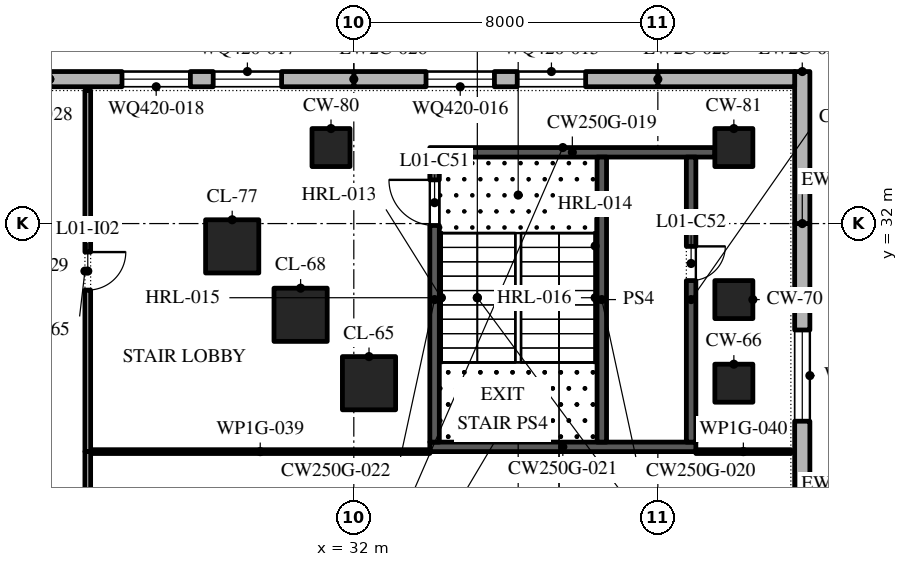
"""IFC4 building model, lengths in metres.
Left out: names, types, materials, properties, quantities, classifications, styles, units other than length and angle.
Written with IfcOpenShell. Run it as: python <this file> out.ifc"""

import sys

from ifc_helpers import new_model, si_unit, direction, frame, frame_2d, origin, origin_2d, place, context, subcontext, project, spatial, polyline, rectangle, outline, extrude, element, fill, save


model = new_model("IFC4")
c1 = context("Model", 3, precision=1e-05, world=origin(), true_north=direction((0.0, 1.0)))
c2 = subcontext(c1, "Body", "Model", "MODEL_VIEW")
j1 = project(units=[si_unit("LENGTHUNIT", "METRE"), si_unit("PLANEANGLEUNIT", "RADIAN")], contexts=[c1])
p1 = place(None, origin())
s1 = spatial("IfcSite", under=j1, at=p1, CompositionType="ELEMENT")
p2 = place(p1, origin())
s2 = spatial("IfcBuilding", under=s1, at=p2, CompositionType="ELEMENT")
p3 = place(p2, frame((0.0, 0.0, 8.0)))
s3 = spatial("IfcBuildingStorey", under=s2, at=p3, CompositionType="ELEMENT", Elevation=8.0)
p4 = place(p3, frame((32.4, 27.8, 0.0), z_axis=(0.0, 0.0, 1.0), x_axis=(1.0, 0.0, 0.0)))
e1 = element("IfcColumn", 1, at=p4, inside=s3, PredefinedType="COLUMN", context=c2, shape_type="SweptSolid", body=[
    extrude(rectangle(XDim=1.4, YDim=1.4, at=origin_2d()), origin(), (0.0, 0.0, 1.0), 6.0),
])
p5 = place(p3, frame((42.0, 27.8, 0.0), z_axis=(0.0, 0.0, 1.0), x_axis=(1.0, 0.0, 0.0)))
e2 = element("IfcColumn", 2, at=p5, inside=s3, PredefinedType="COLUMN", context=c2, shape_type="SweptSolid", body=[
    extrude(rectangle(XDim=1.0, YDim=1.0, at=origin_2d()), origin(), (0.0, 0.0, 1.0), 6.0),
])
p6 = place(p3, frame((30.6, 29.6, 0.0), z_axis=(0.0, 0.0, 1.0), x_axis=(1.0, 0.0, 0.0)))
e3 = element("IfcColumn", 3, at=p6, inside=s3, PredefinedType="COLUMN", context=c2, shape_type="SweptSolid", body=[
    extrude(rectangle(XDim=1.4, YDim=1.4, at=origin_2d()), origin(), (0.0, 0.0, 1.0), 6.0),
])
p7 = place(p3, frame((42.0, 30.0, 0.0), z_axis=(0.0, 0.0, 1.0), x_axis=(1.0, 0.0, 0.0)))
e4 = element("IfcColumn", 4, at=p7, inside=s3, PredefinedType="COLUMN", context=c2, shape_type="SweptSolid", body=[
    extrude(rectangle(XDim=1.0, YDim=1.0, at=origin_2d()), origin(), (0.0, 0.0, 1.0), 6.0),
])
p8 = place(p3, frame((28.8, 31.4, 0.0), z_axis=(0.0, 0.0, 1.0), x_axis=(1.0, 0.0, 0.0)))
e5 = element("IfcColumn", 5, at=p8, inside=s3, PredefinedType="COLUMN", context=c2, shape_type="SweptSolid", body=[
    extrude(rectangle(XDim=1.4, YDim=1.4, at=origin_2d()), origin(), (0.0, 0.0, 1.0), 6.0),
])
for number, where, z_axis, x_axis in (
    (6, (31.4, 34.0, 0.0), (0.0, 0.0, 1.0), (1.0, 0.0, 0.0)),
    (7, (42.0, 34.0, 0.0), (0.0, 0.0, 1.0), (1.0, 0.0, 0.0)),
):
    element("IfcColumn", number, at=place(p3, frame(where, z_axis=z_axis, x_axis=x_axis)), inside=s3, PredefinedType="COLUMN", context=c2, shape_type="SweptSolid", body=[
        extrude(rectangle(XDim=1.0, YDim=1.0, at=origin_2d()), origin(), (0.0, 0.0, 1.0), 6.0),
    ])
p9 = place(p3, frame((43.8, 24.0, 0.0), z_axis=(0.0, 0.0, 1.0), x_axis=(0.0, 1.0, 0.0)))
e8 = element("IfcWall", 8, at=p9, inside=s3, PredefinedType="STANDARD", context=c2, shape_type="SweptSolid", body=[
    extrude(rectangle(XDim=8.0, YDim=0.4, at=frame_2d((4.0, 0.0))), origin(), (0.0, 0.0, 1.0), 5.7),
])
p10 = place(p9, frame((2.8, 0.0, 0.9)))
e9 = element("IfcOpeningElement", 9, at=p10, cuts=e8, PredefinedType="OPENING", context=c2, shape_type="SweptSolid", body=[
    extrude(outline(polyline([(0.0, 0.0), (2.4, 0.0), (2.4, 2.122), (2.379, 2.435), (2.318, 2.743), (2.217, 3.04), (2.078, 3.322), (1.904, 3.583), (1.697, 3.819), (1.461, 4.026), (1.2, 4.2), (0.939, 4.026), (0.703, 3.819), (0.496, 3.583), (0.322, 3.322), (0.183, 3.04), (0.082, 2.743), (0.021, 2.435), (0.0, 2.122), (0.0, 0.0)])), frame((0.0, 0.21, 0.0), z_axis=(0.0, -1.0, 0.0), x_axis=(1.0, 0.0, 0.0)), (0.0, 0.0, 1.0), 0.42),
])
p11 = place(p3, frame((43.8, 32.0, 0.0), z_axis=(0.0, 0.0, 1.0), x_axis=(0.0, 1.0, 0.0)))
e10 = element("IfcWall", 10, at=p11, inside=s3, PredefinedType="STANDARD", context=c2, shape_type="SweptSolid", body=[
    extrude(rectangle(XDim=4.0, YDim=0.4, at=frame_2d((2.0, 0.0))), origin(), (0.0, 0.0, 1.0), 5.7),
])
p12 = place(p3, frame((43.6, 35.8, 0.0), z_axis=(0.0, 0.0, 1.0), x_axis=(-1.0, 0.0, 0.0)))
e11 = element("IfcWall", 11, at=p12, inside=s3, PredefinedType="STANDARD", context=c2, shape_type="SweptSolid", body=[
    extrude(rectangle(XDim=3.6, YDim=0.4, at=frame_2d((1.8, 0.0))), origin(), (0.0, 0.0, 1.0), 5.7),
])
p13 = place(p3, frame((40.0, 35.8, 0.0), z_axis=(0.0, 0.0, 1.0), x_axis=(-1.0, 0.0, 0.0)))
e12 = element("IfcWall", 12, at=p13, inside=s3, PredefinedType="STANDARD", context=c2, shape_type="SweptSolid", body=[
    extrude(rectangle(XDim=8.0, YDim=0.4, at=frame_2d((4.0, 0.0))), origin(), (0.0, 0.0, 1.0), 5.7),
])
p14 = place(p13, frame((1.9, 0.0, 0.9)))
e13 = element("IfcOpeningElement", 13, at=p14, cuts=e12, PredefinedType="OPENING", context=c2, shape_type="SweptSolid", body=[
    extrude(outline(polyline([(0.0, 0.0), (1.8, 0.0), (1.8, 2.641), (1.785, 2.876), (1.739, 3.107), (1.663, 3.33), (1.559, 3.541), (1.428, 3.737), (1.273, 3.914), (1.096, 4.069), (0.9, 4.2), (0.704, 4.069), (0.527, 3.914), (0.372, 3.737), (0.241, 3.541), (0.137, 3.33), (0.061, 3.107), (0.015, 2.876), (0.0, 2.641), (0.0, 0.0)])), frame((0.0, 0.21, 0.0), z_axis=(0.0, -1.0, 0.0), x_axis=(1.0, 0.0, 0.0)), (0.0, 0.0, 1.0), 0.42),
])
p15 = place(p13, frame((4.3, 0.0, 0.9)))
e14 = element("IfcOpeningElement", 14, at=p15, cuts=e12, PredefinedType="OPENING", context=c2, shape_type="SweptSolid", body=[
    extrude(outline(polyline([(0.0, 0.0), (1.8, 0.0), (1.8, 2.641), (1.785, 2.876), (1.739, 3.107), (1.663, 3.33), (1.559, 3.541), (1.428, 3.737), (1.273, 3.914), (1.096, 4.069), (0.9, 4.2), (0.704, 4.069), (0.527, 3.914), (0.372, 3.737), (0.241, 3.541), (0.137, 3.33), (0.061, 3.107), (0.015, 2.876), (0.0, 2.641), (0.0, 0.0)])), frame((0.0, 0.21, 0.0), z_axis=(0.0, -1.0, 0.0), x_axis=(1.0, 0.0, 0.0)), (0.0, 0.0, 1.0), 0.42),
])
p16 = place(p3, frame((32.0, 35.8, 0.0), z_axis=(0.0, 0.0, 1.0), x_axis=(-1.0, 0.0, 0.0)))
e15 = element("IfcWall", 15, at=p16, inside=s3, PredefinedType="STANDARD", context=c2, shape_type="SweptSolid", body=[
    extrude(rectangle(XDim=8.0, YDim=0.4, at=frame_2d((4.0, 0.0))), origin(), (0.0, 0.0, 1.0), 5.7),
])
p17 = place(p16, frame((1.9, 0.0, 0.9)))
e16 = element("IfcOpeningElement", 16, at=p17, cuts=e15, PredefinedType="OPENING", context=c2, shape_type="SweptSolid", body=[
    extrude(outline(polyline([(0.0, 0.0), (1.8, 0.0), (1.8, 2.641), (1.785, 2.876), (1.739, 3.107), (1.663, 3.33), (1.559, 3.541), (1.428, 3.737), (1.273, 3.914), (1.096, 4.069), (0.9, 4.2), (0.704, 4.069), (0.527, 3.914), (0.372, 3.737), (0.241, 3.541), (0.137, 3.33), (0.061, 3.107), (0.015, 2.876), (0.0, 2.641), (0.0, 0.0)])), frame((0.0, 0.21, 0.0), z_axis=(0.0, -1.0, 0.0), x_axis=(1.0, 0.0, 0.0)), (0.0, 0.0, 1.0), 0.42),
])
p18 = place(p16, frame((4.3, 0.0, 0.9)))
e17 = element("IfcOpeningElement", 17, at=p18, cuts=e15, PredefinedType="OPENING", context=c2, shape_type="SweptSolid", body=[
    extrude(outline(polyline([(0.0, 0.0), (1.8, 0.0), (1.8, 2.641), (1.785, 2.876), (1.739, 3.107), (1.663, 3.33), (1.559, 3.541), (1.428, 3.737), (1.273, 3.914), (1.096, 4.069), (0.9, 4.2), (0.704, 4.069), (0.527, 3.914), (0.372, 3.737), (0.241, 3.541), (0.137, 3.33), (0.061, 3.107), (0.015, 2.876), (0.0, 2.641), (0.0, 0.0)])), frame((0.0, 0.21, 0.0), z_axis=(0.0, -1.0, 0.0), x_axis=(1.0, 0.0, 0.0)), (0.0, 0.0, 1.0), 0.42),
])
p19 = place(p3, frame((34.0, 26.125, 0.0), z_axis=(0.0, 0.0, 1.0), x_axis=(1.0, 0.0, 0.0)))
e18 = element("IfcWall", 18, at=p19, inside=s3, PredefinedType="SHEAR", context=c2, shape_type="SweptSolid", body=[
    extrude(rectangle(XDim=7.0, YDim=0.25, at=frame_2d((3.5, 0.0))), origin(), (0.0, 0.0, 1.0), 5.7),
])
p20 = place(p3, frame((34.0, 33.875, 0.0), z_axis=(0.0, 0.0, 1.0), x_axis=(1.0, 0.0, 0.0)))
e19 = element("IfcWall", 19, at=p20, inside=s3, PredefinedType="SHEAR", context=c2, shape_type="SweptSolid", body=[
    extrude(rectangle(XDim=7.5, YDim=0.25, at=frame_2d((3.75, 0.0))), origin(), (0.0, 0.0, 1.0), 5.7),
])
p21 = place(p3, frame((34.125, 26.25, 0.0), z_axis=(0.0, 0.0, 1.0), x_axis=(0.0, 1.0, 0.0)))
e20 = element("IfcWall", 20, at=p21, inside=s3, PredefinedType="SHEAR", context=c2, shape_type="SweptSolid", body=[
    extrude(rectangle(XDim=7.5, YDim=0.25, at=frame_2d((3.75, 0.0))), origin(), (0.0, 0.0, 1.0), 5.7),
])
p22 = place(p21, frame((5.7, 0.0, 0.0)))
e21 = element("IfcOpeningElement", 21, at=p22, cuts=e20, PredefinedType="OPENING", context=c2, shape_type="SweptSolid", body=[
    extrude(rectangle(XDim=1.2, YDim=2.1, at=frame_2d((0.6, 1.05))), frame((0.0, 0.135, 0.0), z_axis=(0.0, -1.0, 0.0), x_axis=(1.0, 0.0, 0.0)), (0.0, 0.0, 1.0), 0.27),
])
p23 = place(p3, frame((40.875, 26.25, 0.0), z_axis=(0.0, 0.0, 1.0), x_axis=(0.0, 1.0, 0.0)))
e22 = element("IfcWall", 22, at=p23, inside=s3, PredefinedType="SHEAR", context=c2, shape_type="SweptSolid", body=[
    extrude(rectangle(XDim=7.5, YDim=0.25, at=frame_2d((3.75, 0.0))), origin(), (0.0, 0.0, 1.0), 5.7),
])
p24 = place(p23, frame((4.25, 0.0, 0.0)))
e23 = element("IfcOpeningElement", 23, at=p24, cuts=e22, PredefinedType="OPENING", context=c2, shape_type="SweptSolid", body=[
    extrude(rectangle(XDim=0.9, YDim=2.1, at=frame_2d((0.45, 1.05))), frame((0.0, 0.135, 0.0), z_axis=(0.0, -1.0, 0.0), x_axis=(1.0, 0.0, 0.0)), (0.0, 0.0, 1.0), 0.27),
])
p25 = place(p3, frame((38.525, 26.25, 0.0), z_axis=(0.0, 0.0, 1.0), x_axis=(0.0, 1.0, 0.0)))
e24 = element("IfcWall", 24, at=p25, inside=s3, PredefinedType="SHEAR", context=c2, shape_type="SweptSolid", body=[
    extrude(rectangle(XDim=7.5, YDim=0.25, at=frame_2d((3.75, 0.0))), origin(), (0.0, 0.0, 1.0), 5.7),
])
p26 = place(p3, frame((25.075, 26.0, 0.0), z_axis=(0.0, 0.0, 1.0), x_axis=(1.0, 0.0, 0.0)))
e25 = element("IfcWall", 25, at=p26, inside=s3, PredefinedType="PARTITIONING", context=c2, shape_type="SweptSolid", body=[
    extrude(rectangle(XDim=8.925, YDim=0.1, at=frame_2d((4.462, 0.0))), origin(), (0.0, 0.0, 1.0), 5.7),
])
p27 = place(p3, frame((41.0, 26.0, 0.0), z_axis=(0.0, 0.0, 1.0), x_axis=(1.0, 0.0, 0.0)))
e26 = element("IfcWall", 26, at=p27, inside=s3, PredefinedType="PARTITIONING", context=c2, shape_type="SweptSolid", body=[
    extrude(rectangle(XDim=2.5, YDim=0.1, at=frame_2d((1.25, 0.0))), origin(), (0.0, 0.0, 1.0), 5.7),
])
p28 = place(p3, frame((25.0, 15.0, 0.0), z_axis=(0.0, 0.0, 1.0), x_axis=(0.0, 1.0, 0.0)))
e27 = element("IfcWall", 27, at=p28, inside=s3, PredefinedType="PARTITIONING", context=c2, shape_type="SweptSolid", body=[
    extrude(rectangle(XDim=11.0, YDim=0.15, at=frame_2d((5.5, 0.0))), origin(), (0.0, 0.0, 1.0), 5.7),
])
p29 = place(p28, frame((4.6, 0.0, 0.0)))
e28 = element("IfcOpeningElement", 28, at=p29, cuts=e27, PredefinedType="OPENING", context=c2, shape_type="SweptSolid", body=[
    extrude(rectangle(XDim=1.8, YDim=2.1, at=frame_2d((0.9, 1.05))), frame((0.0, 0.085, 0.0), z_axis=(0.0, -1.0, 0.0), x_axis=(1.0, 0.0, 0.0)), (0.0, 0.0, 1.0), 0.17),
])
p30 = place(p3, frame((25.0, 26.0, 0.0), z_axis=(0.0, 0.0, 1.0), x_axis=(0.0, 1.0, 0.0)))
e29 = element("IfcWall", 29, at=p30, inside=s3, PredefinedType="PARTITIONING", context=c2, shape_type="SweptSolid", body=[
    extrude(rectangle(XDim=9.5, YDim=0.15, at=frame_2d((4.75, 0.0))), origin(), (0.0, 0.0, 1.0), 5.7),
])
p31 = place(p30, frame((4.25, 0.0, 0.0)))
e30 = element("IfcOpeningElement", 30, at=p31, cuts=e29, PredefinedType="OPENING", context=c2, shape_type="SweptSolid", body=[
    extrude(rectangle(XDim=1.0, YDim=2.1, at=frame_2d((0.5, 1.05))), frame((0.0, 0.085, 0.0), z_axis=(0.0, -1.0, 0.0), x_axis=(1.0, 0.0, 0.0)), (0.0, 0.0, 1.0), 0.17),
])
p32 = place(p10, origin())
e31 = element("IfcWindow", 31, at=p32, inside=s3, PartitioningType="DOUBLE_PANEL_VERTICAL", PredefinedType="WINDOW", context=c2, shape_type="SweptSolid", body=[
    extrude(outline(polyline([(0.0, 0.0), (2.4, 0.0), (2.4, 2.122), (2.379, 2.435), (2.318, 2.743), (2.217, 3.04), (2.078, 3.322), (1.904, 3.583), (1.697, 3.819), (1.461, 4.026), (1.2, 4.2), (0.939, 4.026), (0.703, 3.819), (0.496, 3.583), (0.322, 3.322), (0.183, 3.04), (0.082, 2.743), (0.021, 2.435), (0.0, 2.122), (0.0, 0.0)])), frame((0.0, 0.03, 0.0), z_axis=(0.0, -1.0, 0.0), x_axis=(1.0, 0.0, 0.0)), (0.0, 0.0, 1.0), 0.06),
])
fill(e9, e31)
p33 = place(p14, origin())
e32 = element("IfcWindow", 32, at=p33, inside=s3, PartitioningType="DOUBLE_PANEL_VERTICAL", PredefinedType="WINDOW", context=c2, shape_type="SweptSolid", body=[
    extrude(outline(polyline([(0.0, 0.0), (1.8, 0.0), (1.8, 2.641), (1.785, 2.876), (1.739, 3.107), (1.663, 3.33), (1.559, 3.541), (1.428, 3.737), (1.273, 3.914), (1.096, 4.069), (0.9, 4.2), (0.704, 4.069), (0.527, 3.914), (0.372, 3.737), (0.241, 3.541), (0.137, 3.33), (0.061, 3.107), (0.015, 2.876), (0.0, 2.641), (0.0, 0.0)])), frame((0.0, 0.03, 0.0), z_axis=(0.0, -1.0, 0.0), x_axis=(1.0, 0.0, 0.0)), (0.0, 0.0, 1.0), 0.06),
])
fill(e13, e32)
p34 = place(p15, origin())
e33 = element("IfcWindow", 33, at=p34, inside=s3, PartitioningType="DOUBLE_PANEL_VERTICAL", PredefinedType="WINDOW", context=c2, shape_type="SweptSolid", body=[
    extrude(outline(polyline([(0.0, 0.0), (1.8, 0.0), (1.8, 2.641), (1.785, 2.876), (1.739, 3.107), (1.663, 3.33), (1.559, 3.541), (1.428, 3.737), (1.273, 3.914), (1.096, 4.069), (0.9, 4.2), (0.704, 4.069), (0.527, 3.914), (0.372, 3.737), (0.241, 3.541), (0.137, 3.33), (0.061, 3.107), (0.015, 2.876), (0.0, 2.641), (0.0, 0.0)])), frame((0.0, 0.03, 0.0), z_axis=(0.0, -1.0, 0.0), x_axis=(1.0, 0.0, 0.0)), (0.0, 0.0, 1.0), 0.06),
])
fill(e14, e33)
p35 = place(p17, origin())
e34 = element("IfcWindow", 34, at=p35, inside=s3, PartitioningType="DOUBLE_PANEL_VERTICAL", PredefinedType="WINDOW", context=c2, shape_type="SweptSolid", body=[
    extrude(outline(polyline([(0.0, 0.0), (1.8, 0.0), (1.8, 2.641), (1.785, 2.876), (1.739, 3.107), (1.663, 3.33), (1.559, 3.541), (1.428, 3.737), (1.273, 3.914), (1.096, 4.069), (0.9, 4.2), (0.704, 4.069), (0.527, 3.914), (0.372, 3.737), (0.241, 3.541), (0.137, 3.33), (0.061, 3.107), (0.015, 2.876), (0.0, 2.641), (0.0, 0.0)])), frame((0.0, 0.03, 0.0), z_axis=(0.0, -1.0, 0.0), x_axis=(1.0, 0.0, 0.0)), (0.0, 0.0, 1.0), 0.06),
])
fill(e16, e34)
p36 = place(p18, origin())
e35 = element("IfcWindow", 35, at=p36, inside=s3, PartitioningType="DOUBLE_PANEL_VERTICAL", PredefinedType="WINDOW", context=c2, shape_type="SweptSolid", body=[
    extrude(outline(polyline([(0.0, 0.0), (1.8, 0.0), (1.8, 2.641), (1.785, 2.876), (1.739, 3.107), (1.663, 3.33), (1.559, 3.541), (1.428, 3.737), (1.273, 3.914), (1.096, 4.069), (0.9, 4.2), (0.704, 4.069), (0.527, 3.914), (0.372, 3.737), (0.241, 3.541), (0.137, 3.33), (0.061, 3.107), (0.015, 2.876), (0.0, 2.641), (0.0, 0.0)])), frame((0.0, 0.03, 0.0), z_axis=(0.0, -1.0, 0.0), x_axis=(1.0, 0.0, 0.0)), (0.0, 0.0, 1.0), 0.06),
])
fill(e17, e35)
p37 = place(p22, origin())
e36 = element("IfcDoor", 36, at=p37, inside=s3, OperationType="SINGLE_SWING_LEFT", PredefinedType="DOOR", context=c2, shape_type="SweptSolid", body=[
    extrude(rectangle(XDim=1.2, YDim=2.1, at=frame_2d((0.6, 1.05))), frame((0.0, 0.025, 0.0), z_axis=(0.0, -1.0, 0.0), x_axis=(1.0, 0.0, 0.0)), (0.0, 0.0, 1.0), 0.05),
])
fill(e21, e36)
p38 = place(p24, frame((0.9, 0.2, 0.0), z_axis=(0.0, 0.0, 1.0), x_axis=(-1.0, 0.0, 0.0)))
e37 = element("IfcDoor", 37, at=p38, inside=s3, OperationType="SINGLE_SWING_RIGHT", PredefinedType="DOOR", context=c2, shape_type="SweptSolid", body=[
    extrude(rectangle(XDim=0.9, YDim=2.1, at=frame_2d((0.45, 1.05))), frame((0.0, 0.125, 0.0), z_axis=(0.0, -1.0, 0.0), x_axis=(1.0, 0.0, 0.0)), (0.0, 0.0, 1.0), 0.05),
])
fill(e23, e37)
p39 = place(p31, frame((1.0, 0.0, 0.0), z_axis=(0.0, 0.0, 1.0), x_axis=(-1.0, 0.0, 0.0)))
e38 = element("IfcDoor", 38, at=p39, inside=s3, OperationType="SINGLE_SWING_RIGHT", PredefinedType="DOOR", context=c2, shape_type="SweptSolid", body=[
    extrude(rectangle(XDim=1.0, YDim=2.1, at=frame_2d((0.5, 1.05))), frame((0.0, 0.025, 0.0), z_axis=(0.0, -1.0, 0.0), x_axis=(1.0, 0.0, 0.0)), (0.0, 0.0, 1.0), 0.05),
])
fill(e30, e38)
save(model, sys.argv[1])
